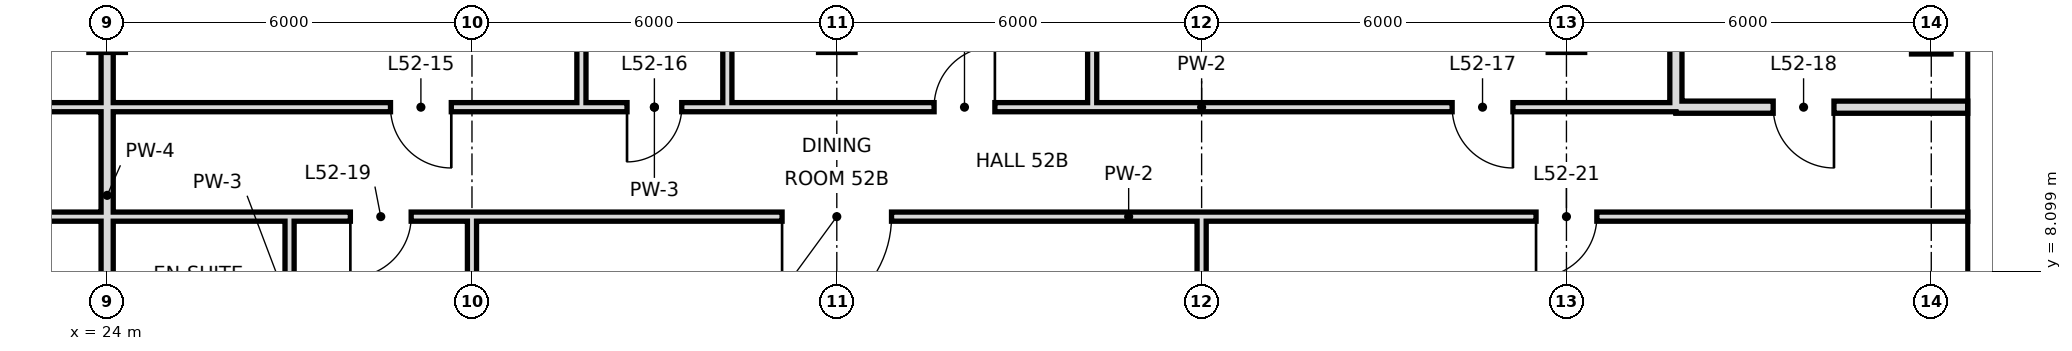
"""IFC4 building model, lengths in metres.
Left out: names, types, materials, properties, quantities, classifications, styles, units other than length and angle.
Written with IfcOpenShell. Run it as: python <this file> out.ifc"""

import sys

from ifc_helpers import new_model, si_unit, direction, frame, frame_2d, origin, origin_2d, place, context, subcontext, project, spatial, rectangle, hollow_rectangle, extrude, element, fill, save


model = new_model("IFC4")
c1 = context("Model", 3, precision=1e-05, world=origin(), true_north=direction((0.0, 1.0)))
c2 = subcontext(c1, "Body", "Model", "MODEL_VIEW")
j1 = project(units=[si_unit("LENGTHUNIT", "METRE"), si_unit("PLANEANGLEUNIT", "RADIAN")], contexts=[c1])
p1 = place(None, origin())
s1 = spatial("IfcSite", under=j1, at=p1, CompositionType="ELEMENT")
p2 = place(p1, origin())
s2 = spatial("IfcBuilding", under=s1, at=p2, CompositionType="ELEMENT")
p3 = place(p2, frame((0.0, 0.0, 222.6)))
s3 = spatial("IfcBuildingStorey", under=s2, at=p3, CompositionType="ELEMENT", Elevation=222.6)
p4 = place(p3, frame((54.0, 12.0, 0.0), z_axis=(0.0, 0.0, 1.0), x_axis=(1.0, 0.0, 0.0)))
e1 = element("IfcColumn", 1, at=p4, inside=s3, PredefinedType="COLUMN", context=c2, shape_type="SweptSolid", body=[
    extrude(hollow_rectangle(XDim=0.65, YDim=0.65, WallThickness=0.032, at=origin_2d()), origin(), (0.0, 0.0, 1.0), 3.6),
])
p5 = place(p3, frame((24.0, 0.0, 0.0), z_axis=(0.0, 0.0, 1.0), x_axis=(0.0, 1.0, 0.0)))
e2 = element("IfcWall", 2, at=p5, inside=s3, PredefinedType="SOLIDWALL", context=c2, shape_type="SweptSolid", body=[
    extrude(rectangle(XDim=18.7, YDim=0.2, at=frame_2d((9.35, 0.0))), origin(), (0.0, 0.0, 1.0), 2.72),
])
p6 = place(p3, frame((27.0, 6.0, 0.0), z_axis=(0.0, 0.0, 1.0), x_axis=(0.0, 1.0, 0.0)))
e3 = element("IfcWall", 3, at=p6, inside=s3, PredefinedType="PARTITIONING", context=c2, shape_type="SweptSolid", body=[
    extrude(rectangle(XDim=3.0, YDim=0.15, at=frame_2d((1.5, 0.0))), origin(), (0.0, 0.0, 1.0), 3.42),
])
p7 = place(p3, frame((30.0, -0.6, 0.0), z_axis=(0.0, 0.0, 1.0), x_axis=(0.0, 1.0, 0.0)))
e4 = element("IfcWall", 4, at=p7, inside=s3, PredefinedType="PARTITIONING", context=c2, shape_type="SweptSolid", body=[
    extrude(rectangle(XDim=9.6, YDim=0.15, at=frame_2d((4.8, 0.0))), origin(), (0.0, 0.0, 1.0), 2.72),
])
for number, where, z_axis, x_axis in (
    (5, (31.8, 10.8, 0.0), (0.0, 0.0, 1.0), (0.0, 1.0, 0.0)),
    (6, (34.2, 10.8, 0.0), (0.0, 0.0, 1.0), (0.0, 1.0, 0.0)),
    (7, (40.2, 10.8, 0.0), (0.0, 0.0, 1.0), (0.0, 1.0, 0.0)),
):
    element("IfcWall", number, at=place(p3, frame(where, z_axis=z_axis, x_axis=x_axis)), inside=s3, PredefinedType="PARTITIONING", context=c2, shape_type="SweptSolid", body=[
        extrude(rectangle(XDim=7.9, YDim=0.15, at=frame_2d((3.95, 0.0))), origin(), (0.0, 0.0, 1.0), 3.42),
    ])
p8 = place(p3, frame((42.0, -0.6, 0.0), z_axis=(0.0, 0.0, 1.0), x_axis=(0.0, 1.0, 0.0)))
e8 = element("IfcWall", 8, at=p8, inside=s3, PredefinedType="PARTITIONING", context=c2, shape_type="SweptSolid", body=[
    extrude(rectangle(XDim=9.6, YDim=0.15, at=frame_2d((4.8, 0.0))), origin(), (0.0, 0.0, 1.0), 2.72),
])
p9 = place(p3, frame((49.8, 10.8, 0.0), z_axis=(0.0, 0.0, 1.0), x_axis=(0.0, 1.0, 0.0)))
e9 = element("IfcWall", 9, at=p9, inside=s3, PredefinedType="SOLIDWALL", context=c2, shape_type="SweptSolid", body=[
    extrude(rectangle(XDim=7.2, YDim=0.2, at=frame_2d((3.6, 0.0))), origin(), (0.0, 0.0, 1.0), 2.97),
])
p10 = place(p3, frame((49.8, 10.8, 0.0), z_axis=(0.0, 0.0, 1.0), x_axis=(1.0, 0.0, 0.0)))
e10 = element("IfcWall", 10, at=p10, inside=s3, PredefinedType="SOLIDWALL", context=c2, shape_type="SweptSolid", body=[
    extrude(rectangle(XDim=4.8, YDim=0.2, at=frame_2d((2.4, 0.0))), origin(), (0.0, 0.0, 1.0), 2.97),
])
p11 = place(p10, frame((1.6, 0.0, 0.0)))
e11 = element("IfcOpeningElement", 11, at=p11, cuts=e10, PredefinedType="OPENING", context=c2, shape_type="SweptSolid", body=[
    extrude(rectangle(XDim=1.0, YDim=2.4, at=frame_2d((0.5, 1.2))), frame((0.0, 0.11, 0.0), z_axis=(0.0, -1.0, 0.0), x_axis=(1.0, 0.0, 0.0)), (0.0, 0.0, 1.0), 0.22),
])
p12 = place(p3, frame((7.2, 10.8, 0.0), z_axis=(0.0, 0.0, 1.0), x_axis=(1.0, 0.0, 0.0)))
e12 = element("IfcWall", 12, at=p12, inside=s3, PredefinedType="PARTITIONING", context=c2, shape_type="SweptSolid", body=[
    extrude(rectangle(XDim=24.6, YDim=0.15, at=frame_2d((12.3, 0.0))), origin(), (0.0, 0.0, 1.0), 3.42),
])
p13 = place(p12, frame((1.6, 0.0, 0.0)))
e13 = element("IfcOpeningElement", 13, at=p13, cuts=e12, PredefinedType="OPENING", context=c2, shape_type="SweptSolid", body=[
    extrude(rectangle(XDim=1.0, YDim=2.4, at=frame_2d((0.5, 1.2))), frame((0.0, 0.085, 0.0), z_axis=(0.0, -1.0, 0.0), x_axis=(1.0, 0.0, 0.0)), (0.0, 0.0, 1.0), 0.17),
])
p14 = place(p12, frame((9.04, 0.0, 0.0)))
e14 = element("IfcOpeningElement", 14, at=p14, cuts=e12, PredefinedType="OPENING", context=c2, shape_type="SweptSolid", body=[
    extrude(rectangle(XDim=1.0, YDim=2.4, at=frame_2d((0.5, 1.2))), frame((0.0, 0.085, 0.0), z_axis=(0.0, -1.0, 0.0), x_axis=(1.0, 0.0, 0.0)), (0.0, 0.0, 1.0), 0.17),
])
p15 = place(p12, frame((21.46, 0.0, 0.0)))
e15 = element("IfcOpeningElement", 15, at=p15, cuts=e12, PredefinedType="OPENING", context=c2, shape_type="SweptSolid", body=[
    extrude(rectangle(XDim=1.0, YDim=2.4, at=frame_2d((0.5, 1.2))), frame((0.0, 0.085, 0.0), z_axis=(0.0, -1.0, 0.0), x_axis=(1.0, 0.0, 0.0)), (0.0, 0.0, 1.0), 0.17),
])
p16 = place(p3, frame((34.2, 10.8, 0.0), z_axis=(0.0, 0.0, 1.0), x_axis=(1.0, 0.0, 0.0)))
e16 = element("IfcWall", 16, at=p16, inside=s3, PredefinedType="PARTITIONING", context=c2, shape_type="SweptSolid", body=[
    extrude(rectangle(XDim=15.6, YDim=0.15, at=frame_2d((7.8, 0.0))), origin(), (0.0, 0.0, 1.0), 3.42),
])
p17 = place(p16, frame((3.4, 0.0, 0.0)))
e17 = element("IfcOpeningElement", 17, at=p17, cuts=e16, PredefinedType="OPENING", context=c2, shape_type="SweptSolid", body=[
    extrude(rectangle(XDim=1.0, YDim=2.4, at=frame_2d((0.5, 1.2))), frame((0.0, 0.085, 0.0), z_axis=(0.0, -1.0, 0.0), x_axis=(1.0, 0.0, 0.0)), (0.0, 0.0, 1.0), 0.17),
])
p18 = place(p16, frame((11.92, 0.0, 0.0)))
e18 = element("IfcOpeningElement", 18, at=p18, cuts=e16, PredefinedType="OPENING", context=c2, shape_type="SweptSolid", body=[
    extrude(rectangle(XDim=1.0, YDim=2.4, at=frame_2d((0.5, 1.2))), frame((0.0, 0.085, 0.0), z_axis=(0.0, -1.0, 0.0), x_axis=(1.0, 0.0, 0.0)), (0.0, 0.0, 1.0), 0.17),
])
p19 = place(p3, frame((31.8, 10.8, 0.0), z_axis=(0.0, 0.0, 1.0), x_axis=(1.0, 0.0, 0.0)))
e19 = element("IfcWall", 19, at=p19, inside=s3, PredefinedType="PARTITIONING", context=c2, shape_type="SweptSolid", body=[
    extrude(rectangle(XDim=2.4, YDim=0.15, at=frame_2d((1.2, 0.0))), origin(), (0.0, 0.0, 1.0), 3.42),
])
p20 = place(p19, frame((0.75, 0.0, 0.0)))
e20 = element("IfcOpeningElement", 20, at=p20, cuts=e19, PredefinedType="OPENING", context=c2, shape_type="SweptSolid", body=[
    extrude(rectangle(XDim=0.9, YDim=2.4, at=frame_2d((0.45, 1.2))), frame((0.0, 0.085, 0.0), z_axis=(0.0, -1.0, 0.0), x_axis=(1.0, 0.0, 0.0)), (0.0, 0.0, 1.0), 0.17),
])
p21 = place(p3, frame((6.0, 9.0, 0.0), z_axis=(0.0, 0.0, 1.0), x_axis=(1.0, 0.0, 0.0)))
e21 = element("IfcWall", 21, at=p21, inside=s3, PredefinedType="PARTITIONING", context=c2, shape_type="SweptSolid", body=[
    extrude(rectangle(XDim=18.0, YDim=0.15, at=frame_2d((9.0, 0.0))), origin(), (0.0, 0.0, 1.0), 3.42),
])
p22 = place(p21, frame((5.5, 0.0, 0.0)))
e22 = element("IfcOpeningElement", 22, at=p22, cuts=e21, PredefinedType="OPENING", context=c2, shape_type="SweptSolid", body=[
    extrude(rectangle(XDim=1.0, YDim=2.4, at=frame_2d((0.5, 1.2))), frame((0.0, 0.085, 0.0), z_axis=(0.0, -1.0, 0.0), x_axis=(1.0, 0.0, 0.0)), (0.0, 0.0, 1.0), 0.17),
])
p23 = place(p21, frame((13.6, 0.0, 0.0)))
e23 = element("IfcOpeningElement", 23, at=p23, cuts=e21, PredefinedType="OPENING", context=c2, shape_type="SweptSolid", body=[
    extrude(rectangle(XDim=1.0, YDim=2.4, at=frame_2d((0.5, 1.2))), frame((0.0, 0.085, 0.0), z_axis=(0.0, -1.0, 0.0), x_axis=(1.0, 0.0, 0.0)), (0.0, 0.0, 1.0), 0.17),
])
p24 = place(p3, frame((27.0, 9.0, 0.0), z_axis=(0.0, 0.0, 1.0), x_axis=(1.0, 0.0, 0.0)))
e24 = element("IfcWall", 24, at=p24, inside=s3, PredefinedType="PARTITIONING", context=c2, shape_type="SweptSolid", body=[
    extrude(rectangle(XDim=27.6, YDim=0.15, at=frame_2d((13.8, 0.0))), origin(), (0.0, 0.0, 1.0), 3.42),
])
p25 = place(p24, frame((1.0, 0.0, 0.0)))
e25 = element("IfcOpeningElement", 25, at=p25, cuts=e24, PredefinedType="OPENING", context=c2, shape_type="SweptSolid", body=[
    extrude(rectangle(XDim=1.0, YDim=2.4, at=frame_2d((0.5, 1.2))), frame((0.0, 0.085, 0.0), z_axis=(0.0, -1.0, 0.0), x_axis=(1.0, 0.0, 0.0)), (0.0, 0.0, 1.0), 0.17),
])
p26 = place(p24, frame((8.1, 0.0, 0.0)))
e26 = element("IfcOpeningElement", 26, at=p26, cuts=e24, PredefinedType="OPENING", context=c2, shape_type="SweptSolid", body=[
    extrude(rectangle(XDim=1.8, YDim=2.4, at=frame_2d((0.9, 1.2))), frame((0.0, 0.085, 0.0), z_axis=(0.0, -1.0, 0.0), x_axis=(1.0, 0.0, 0.0)), (0.0, 0.0, 1.0), 0.17),
])
p27 = place(p24, frame((20.5, 0.0, 0.0)))
e27 = element("IfcOpeningElement", 27, at=p27, cuts=e24, PredefinedType="OPENING", context=c2, shape_type="SweptSolid", body=[
    extrude(rectangle(XDim=1.0, YDim=2.4, at=frame_2d((0.5, 1.2))), frame((0.0, 0.085, 0.0), z_axis=(0.0, -1.0, 0.0), x_axis=(1.0, 0.0, 0.0)), (0.0, 0.0, 1.0), 0.17),
])
p28 = place(p3, frame((24.0, 9.0, 0.0), z_axis=(0.0, 0.0, 1.0), x_axis=(1.0, 0.0, 0.0)))
e28 = element("IfcWall", 28, at=p28, inside=s3, PredefinedType="PARTITIONING", context=c2, shape_type="SweptSolid", body=[
    extrude(rectangle(XDim=3.0, YDim=0.15, at=frame_2d((1.5, 0.0))), origin(), (0.0, 0.0, 1.0), 3.42),
])
p29 = place(p17, frame((1.0, 0.0, 0.0), z_axis=(0.0, 0.0, 1.0), x_axis=(-1.0, 0.0, 0.0)))
e29 = element("IfcDoor", 29, at=p29, inside=s3, OperationType="SINGLE_SWING_LEFT", PredefinedType="DOOR", context=c2, shape_type="SweptSolid", body=[
    extrude(rectangle(XDim=1.0, YDim=2.4, at=frame_2d((0.5, 1.2))), frame((0.0, 0.025, 0.0), z_axis=(0.0, -1.0, 0.0), x_axis=(1.0, 0.0, 0.0)), (0.0, 0.0, 1.0), 0.05),
])
fill(e17, e29)
p30 = place(p15, origin())
e30 = element("IfcDoor", 30, at=p30, inside=s3, OperationType="SINGLE_SWING_RIGHT", PredefinedType="DOOR", context=c2, shape_type="SweptSolid", body=[
    extrude(rectangle(XDim=1.0, YDim=2.4, at=frame_2d((0.5, 1.2))), frame((0.0, 0.025, 0.0), z_axis=(0.0, -1.0, 0.0), x_axis=(1.0, 0.0, 0.0)), (0.0, 0.0, 1.0), 0.05),
])
fill(e15, e30)
p31 = place(p20, frame((0.9, 0.0, 0.0), z_axis=(0.0, 0.0, 1.0), x_axis=(-1.0, 0.0, 0.0)))
e31 = element("IfcDoor", 31, at=p31, inside=s3, OperationType="SINGLE_SWING_RIGHT", PredefinedType="DOOR", context=c2, shape_type="SweptSolid", body=[
    extrude(rectangle(XDim=0.9, YDim=2.4, at=frame_2d((0.45, 1.2))), frame((0.0, 0.025, 0.0), z_axis=(0.0, -1.0, 0.0), x_axis=(1.0, 0.0, 0.0)), (0.0, 0.0, 1.0), 0.05),
])
fill(e20, e31)
p32 = place(p18, origin())
e32 = element("IfcDoor", 32, at=p32, inside=s3, OperationType="SINGLE_SWING_RIGHT", PredefinedType="DOOR", context=c2, shape_type="SweptSolid", body=[
    extrude(rectangle(XDim=1.0, YDim=2.4, at=frame_2d((0.5, 1.2))), frame((0.0, 0.025, 0.0), z_axis=(0.0, -1.0, 0.0), x_axis=(1.0, 0.0, 0.0)), (0.0, 0.0, 1.0), 0.05),
])
fill(e18, e32)
p33 = place(p11, origin())
e33 = element("IfcDoor", 33, at=p33, inside=s3, OperationType="SINGLE_SWING_RIGHT", PredefinedType="DOOR", context=c2, shape_type="SweptSolid", body=[
    extrude(rectangle(XDim=1.0, YDim=2.4, at=frame_2d((0.5, 1.2))), frame((0.0, 0.025, 0.0), z_axis=(0.0, -1.0, 0.0), x_axis=(1.0, 0.0, 0.0)), (0.0, 0.0, 1.0), 0.05),
])
fill(e11, e33)
p34 = place(p25, frame((1.0, 0.0, 0.0), z_axis=(0.0, 0.0, 1.0), x_axis=(-1.0, 0.0, 0.0)))
e34 = element("IfcDoor", 34, at=p34, inside=s3, OperationType="SINGLE_SWING_RIGHT", PredefinedType="DOOR", context=c2, shape_type="SweptSolid", body=[
    extrude(rectangle(XDim=1.0, YDim=2.4, at=frame_2d((0.5, 1.2))), frame((0.0, 0.025, 0.0), z_axis=(0.0, -1.0, 0.0), x_axis=(1.0, 0.0, 0.0)), (0.0, 0.0, 1.0), 0.05),
])
fill(e25, e34)
p35 = place(p26, frame((1.8, 0.0, 0.0), z_axis=(0.0, 0.0, 1.0), x_axis=(-1.0, 0.0, 0.0)))
e35 = element("IfcDoor", 35, at=p35, inside=s3, OperationType="SINGLE_SWING_RIGHT", PredefinedType="DOOR", context=c2, shape_type="SweptSolid", body=[
    extrude(rectangle(XDim=1.8, YDim=2.4, at=frame_2d((0.9, 1.2))), frame((0.0, 0.025, 0.0), z_axis=(0.0, -1.0, 0.0), x_axis=(1.0, 0.0, 0.0)), (0.0, 0.0, 1.0), 0.05),
])
fill(e26, e35)
p36 = place(p27, frame((1.0, 0.0, 0.0), z_axis=(0.0, 0.0, 1.0), x_axis=(-1.0, 0.0, 0.0)))
e36 = element("IfcDoor", 36, at=p36, inside=s3, OperationType="SINGLE_SWING_RIGHT", PredefinedType="DOOR", context=c2, shape_type="SweptSolid", body=[
    extrude(rectangle(XDim=1.0, YDim=2.4, at=frame_2d((0.5, 1.2))), frame((0.0, 0.025, 0.0), z_axis=(0.0, -1.0, 0.0), x_axis=(1.0, 0.0, 0.0)), (0.0, 0.0, 1.0), 0.05),
])
fill(e27, e36)
save(model, sys.argv[1])
